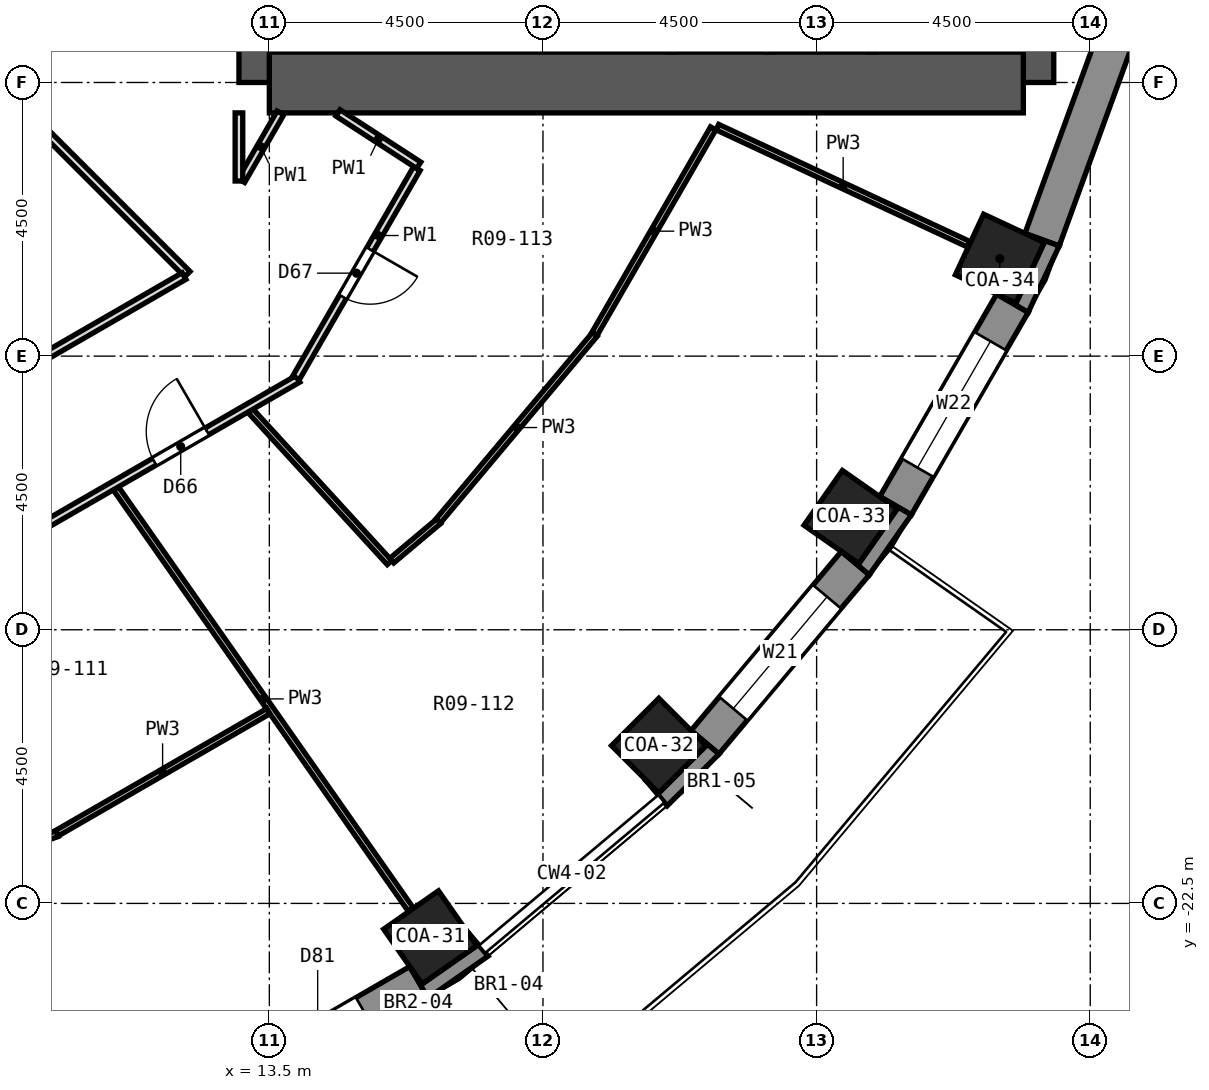
"""IFC4 building model, lengths in metres.
Left out: names, types, materials, properties, quantities, classifications, styles, units other than length and angle.
Written with IfcOpenShell. Run it as: python <this file> out.ifc"""

import sys

from ifc_helpers import new_model, si_unit, direction, frame, frame_2d, origin, origin_2d, place, context, subcontext, project, spatial, polyline, rectangle, outline, extrude, element, fill, save


model = new_model("IFC4")
c1 = context("Model", 3, precision=1e-05, world=origin(), true_north=direction((0.0, 1.0)))
c2 = subcontext(c1, "Body", "Model", "MODEL_VIEW")
j1 = project(units=[si_unit("LENGTHUNIT", "METRE"), si_unit("PLANEANGLEUNIT", "RADIAN")], contexts=[c1])
p1 = place(None, origin())
s1 = spatial("IfcSite", under=j1, at=p1, CompositionType="ELEMENT")
p2 = place(p1, origin())
s2 = spatial("IfcBuilding", under=s1, at=p2, CompositionType="ELEMENT")
p3 = place(p2, frame((0.0, 0.0, 26.3)))
s3 = spatial("IfcBuildingStorey", under=s2, at=p3, CompositionType="ELEMENT", Elevation=26.3)
p4 = place(p3, frame((16.146, -23.059, -0.55), z_axis=(0.0, 0.0, 1.0), x_axis=(0.573576436351, -0.819152044289, 0.0)))
e1 = element("IfcColumn", 1, at=p4, inside=s3, PredefinedType="COLUMN", context=c2, shape_type="SweptSolid", body=[
    extrude(rectangle(XDim=1.1, YDim=1.1, at=origin_2d()), origin(), (0.0, 0.0, 1.0), 3.85),
])
p5 = place(p3, frame((19.905, -19.905, 0.0), z_axis=(0.0, 0.0, 1.0), x_axis=(0.707106781187, -0.707106781187, 0.0)))
e2 = element("IfcColumn", 2, at=p5, inside=s3, PredefinedType="COLUMN", context=c2, shape_type="SweptSolid", body=[
    extrude(rectangle(XDim=1.1, YDim=1.1, at=origin_2d()), origin(), (0.0, 0.0, 1.0), 3.3),
])
p6 = place(p3, frame((23.059, -16.146, -0.55), z_axis=(0.0, 0.0, 1.0), x_axis=(0.819152044289, -0.573576436351, 0.0)))
e3 = element("IfcColumn", 3, at=p6, inside=s3, PredefinedType="COLUMN", context=c2, shape_type="SweptSolid", body=[
    extrude(rectangle(XDim=1.1, YDim=1.1, at=origin_2d()), origin(), (0.0, 0.0, 1.0), 3.85),
])
p7 = place(p3, frame((25.512, -11.897, 0.0), z_axis=(0.0, 0.0, 1.0), x_axis=(0.906307787037, -0.422618261741, 0.0)))
e4 = element("IfcColumn", 4, at=p7, inside=s3, PredefinedType="COLUMN", context=c2, shape_type="SweptSolid", body=[
    extrude(rectangle(XDim=1.1, YDim=1.1, at=origin_2d()), origin(), (0.0, 0.0, 1.0), 3.3),
])
p8 = place(p3, frame((13.5, -9.0, 0.0), z_axis=(0.0, 0.0, 1.0), x_axis=(0.0, 1.0, 0.0)))
e5 = element("IfcWall", 5, at=p8, inside=s3, PredefinedType="SHEAR", context=c2, shape_type="SweptSolid", body=[
    extrude(rectangle(XDim=18.0, YDim=1.0, at=frame_2d((9.0, 0.0))), origin(), (0.0, 0.0, 1.0), 3.3),
])
p9 = place(p8, frame((15.4, 0.0, 0.0)))
e6 = element("IfcOpeningElement", 6, at=p9, cuts=e5, PredefinedType="OPENING", context=c2, shape_type="SweptSolid", body=[
    extrude(rectangle(XDim=1.2, YDim=2.1, at=frame_2d((0.6, 1.05))), frame((0.0, 0.512, 0.0), z_axis=(0.0, -1.0, 0.0), x_axis=(1.0, 0.0, 0.0)), (0.0, 0.0, 1.0), 1.024),
])
p10 = place(p8, frame((1.4, 0.0, 0.0)))
e7 = element("IfcOpeningElement", 7, at=p10, cuts=e5, PredefinedType="OPENING", context=c2, shape_type="SweptSolid", body=[
    extrude(rectangle(XDim=1.2, YDim=2.1, at=frame_2d((0.6, 1.05))), frame((0.0, 0.512, 0.0), z_axis=(0.0, -1.0, 0.0), x_axis=(1.0, 0.0, 0.0)), (0.0, 0.0, 1.0), 1.024),
])
p11 = place(p8, frame((7.5, 0.0, 0.0)))
e8 = element("IfcOpeningElement", 8, at=p11, cuts=e5, PredefinedType="OPENING", context=c2, shape_type="SweptSolid", body=[
    extrude(rectangle(XDim=3.0, YDim=2.4, at=frame_2d((1.5, 1.2))), frame((0.0, 0.512, 0.0), z_axis=(0.0, -1.0, 0.0), x_axis=(1.0, 0.0, 0.0)), (0.0, 0.0, 1.0), 1.024),
])
p12 = place(p3, frame((25.9, -9.0, 0.0), z_axis=(0.0, 0.0, 1.0), x_axis=(0.0, 1.0, 0.0)))
e9 = element("IfcWall", 9, at=p12, inside=s3, PredefinedType="SHEAR", context=c2, shape_type="SweptSolid", body=[
    extrude(rectangle(XDim=18.0, YDim=1.0, at=frame_2d((9.0, 0.0))), origin(), (0.0, 0.0, 1.0), 3.3),
])
p13 = place(p3, frame((13.5, -9.0, 0.0), z_axis=(0.0, 0.0, 1.0), x_axis=(1.0, 0.0, 0.0)))
e10 = element("IfcWall", 10, at=p13, inside=s3, PredefinedType="SHEAR", context=c2, shape_type="SweptSolid", body=[
    extrude(rectangle(XDim=12.4, YDim=1.0, at=frame_2d((6.2, 0.0))), origin(), (0.0, 0.0, 1.0), 3.3),
])
p14 = place(p3, frame((12.63, -25.721, 0.0), z_axis=(0.0, 0.0, 1.0), x_axis=(0.86603124159, 0.499989888488, 0.0)))
e11 = element("IfcWall", 11, at=p14, inside=s3, PredefinedType="SOLIDWALL", context=c2, shape_type="SweptSolid", body=[
    extrude(rectangle(XDim=3.846, YDim=0.6, at=frame_2d((1.923, 0.0))), origin(), (0.0, 0.0, 1.0), 2.75),
])
p15 = place(p14, frame((1.023, 0.0, 0.0)))
e12 = element("IfcOpeningElement", 12, at=p15, cuts=e11, PredefinedType="OPENING", context=c2, shape_type="SweptSolid", body=[
    extrude(rectangle(XDim=1.8, YDim=2.4, at=frame_2d((0.9, 1.2))), frame((0.0, 0.312, 0.0), z_axis=(0.0, -1.0, 0.0), x_axis=(1.0, 0.0, 0.0)), (0.0, 0.0, 1.0), 0.624),
])
p16 = place(p3, frame((20.665, -19.85, 0.0), z_axis=(0.0, 0.0, 1.0), x_axis=(0.642809392687, 0.766026164483, 0.0)))
e13 = element("IfcWall", 13, at=p16, inside=s3, PredefinedType="SOLIDWALL", context=c2, shape_type="SweptSolid", body=[
    extrude(rectangle(XDim=3.846, YDim=0.6, at=frame_2d((1.923, 0.0))), origin(), (0.0, 0.0, 1.0), 2.75),
])
p17 = place(p16, frame((0.723, 0.0, 0.9)))
e14 = element("IfcOpeningElement", 14, at=p17, cuts=e13, PredefinedType="OPENING", context=c2, shape_type="SweptSolid", body=[
    extrude(rectangle(XDim=2.4, YDim=1.8, at=frame_2d((1.2, 0.9))), frame((0.0, 0.312, 0.0), z_axis=(0.0, -1.0, 0.0), x_axis=(1.0, 0.0, 0.0)), (0.0, 0.0, 1.0), 0.624),
])
p18 = place(p3, frame((23.798, -15.96, 0.0), z_axis=(0.0, 0.0, 1.0), x_axis=(0.499989888488, 0.86603124159, 0.0)))
e15 = element("IfcWall", 15, at=p18, inside=s3, PredefinedType="SOLIDWALL", context=c2, shape_type="SweptSolid", body=[
    extrude(rectangle(XDim=3.846, YDim=0.6, at=frame_2d((1.923, 0.0))), origin(), (0.0, 0.0, 1.0), 2.75),
])
p19 = place(p18, frame((0.723, 0.0, 0.9)))
e16 = element("IfcOpeningElement", 16, at=p19, cuts=e15, PredefinedType="OPENING", context=c2, shape_type="SweptSolid", body=[
    extrude(rectangle(XDim=2.4, YDim=1.8, at=frame_2d((1.2, 0.9))), frame((0.0, 0.312, 0.0), z_axis=(0.0, -1.0, 0.0), x_axis=(1.0, 0.0, 0.0)), (0.0, 0.0, 1.0), 0.624),
])
p20 = place(p3, frame((26.208, -11.585, 0.0), z_axis=(0.0, 0.0, 1.0), x_axis=(0.342028474173, 0.939689588564, 0.0)))
e17 = element("IfcWall", 17, at=p20, inside=s3, PredefinedType="SOLIDWALL", context=c2, shape_type="SweptSolid", body=[
    extrude(rectangle(XDim=3.846, YDim=0.6, at=frame_2d((1.923, 0.0))), origin(), (0.0, 0.0, 1.0), 2.75),
])
p21 = place(p3, origin())
e18 = element("IfcWall", 18, at=p21, inside=s3, PredefinedType="SOLIDWALL", context=c2, shape_type="SweptSolid", body=[
    extrude(outline(polyline([(16.11, -24.058), (17.097, -23.367), (16.711, -22.907), (16.912, -23.194), (16.011, -23.825), (15.81, -23.538), (16.11, -24.058)])), origin(), (0.0, 0.0, 1.0), 2.75),
])
p22 = place(p3, origin())
e19 = element("IfcWall", 19, at=p22, inside=s3, PredefinedType="SOLIDWALL", context=c2, shape_type="SweptSolid", body=[
    extrude(outline(polyline([(20.895, -20.043), (20.435, -19.657), (20.683, -19.905), (19.905, -20.683), (19.657, -20.435), (20.043, -20.895), (20.895, -20.043)])), origin(), (0.0, 0.0, 1.0), 2.75),
])
p23 = place(p3, origin())
e20 = element("IfcWall", 20, at=p23, inside=s3, PredefinedType="SOLIDWALL", context=c2, shape_type="SweptSolid", body=[
    extrude(outline(polyline([(23.367, -17.097), (24.058, -16.11), (23.538, -15.81), (23.825, -16.011), (23.194, -16.912), (22.907, -16.711), (23.367, -17.097)])), origin(), (0.0, 0.0, 1.0), 2.75),
])
p24 = place(p3, origin())
e21 = element("IfcWall", 21, at=p24, inside=s3, PredefinedType="SOLIDWALL", context=c2, shape_type="SweptSolid", body=[
    extrude(outline(polyline([(26.49, -11.688), (25.926, -11.483), (26.243, -11.631), (25.779, -12.628), (25.461, -12.479), (25.981, -12.78), (26.49, -11.688)])), origin(), (0.0, 0.0, 1.0), 2.75),
])
p25 = place(p3, frame((10.976, -15.674, 0.0), z_axis=(0.0, 0.0, 1.0), x_axis=(0.573553424511, -0.819168156872, 0.0)))
e22 = element("IfcWall", 22, at=p25, inside=s3, PredefinedType="PARTITIONING", context=c2, shape_type="SweptSolid", body=[
    extrude(rectangle(XDim=8.455, YDim=0.1, at=frame_2d((4.228, 0.0))), origin(), (0.0, 0.0, 1.0), 2.75),
])
p26 = place(p3, frame((13.187, -14.396, 0.0), z_axis=(0.0, 0.0, 1.0), x_axis=(0.675447264994, -0.737408294103, 0.0)))
e23 = element("IfcWall", 23, at=p26, inside=s3, PredefinedType="PARTITIONING", context=c2, shape_type="SweptSolid", body=[
    extrude(rectangle(XDim=3.389, YDim=0.1, at=frame_2d((1.694, 0.0))), origin(), (0.0, 0.0, 1.0), 2.75),
])
p27 = place(p3, frame((6.783, -6.783, 0.0), z_axis=(0.0, 0.0, 1.0), x_axis=(0.707106781187, -0.707106781187, 0.0)))
e24 = element("IfcWall", 24, at=p27, inside=s3, PredefinedType="PARTITIONING", context=c2, shape_type="SweptSolid", body=[
    extrude(rectangle(XDim=7.594, YDim=0.125, at=frame_2d((3.797, 0.0))), origin(), (0.0, 0.0, 1.0), 2.75),
])
p28 = place(p3, frame((14.629, -9.5, 0.0), z_axis=(0.0, 0.0, 1.0), x_axis=(0.838795721465, -0.544446267002, 0.0)))
e25 = element("IfcWall", 25, at=p28, inside=s3, PredefinedType="PARTITIONING", context=c2, shape_type="SweptSolid", body=[
    extrude(rectangle(XDim=1.583, YDim=0.125, at=frame_2d((0.792, 0.0))), origin(), (0.0, 0.0, 1.0), 2.75),
])
p29 = place(p3, frame((20.868, -9.734, 0.0), z_axis=(0.0, 0.0, 1.0), x_axis=(0.906374415398, -0.422475347342, 0.0)))
e26 = element("IfcWall", 26, at=p29, inside=s3, PredefinedType="PARTITIONING", context=c2, shape_type="SweptSolid", body=[
    extrude(rectangle(XDim=4.563, YDim=0.1, at=frame_2d((2.281, 0.0))), origin(), (0.0, 0.0, 1.0), 2.75),
])
p30 = place(p3, frame((8.956, -21.738, 0.0), z_axis=(0.0, 0.0, 1.0), x_axis=(0.939501535219, 0.342544690983, 0.0)))
e27 = element("IfcWall", 27, at=p30, inside=s3, PredefinedType="PARTITIONING", context=c2, shape_type="SweptSolid", body=[
    extrude(rectangle(XDim=1.125, YDim=0.1, at=frame_2d((0.562, 0.0))), origin(), (0.0, 0.0, 1.0), 2.75),
])
p31 = place(p3, frame((10.008, -21.345, 0.0), z_axis=(0.0, 0.0, 1.0), x_axis=(0.866077124662, 0.49991040611, 0.0)))
e28 = element("IfcWall", 28, at=p31, inside=s3, PredefinedType="PARTITIONING", context=c2, shape_type="SweptSolid", body=[
    extrude(rectangle(XDim=4.01, YDim=0.1, at=frame_2d((2.005, 0.0))), origin(), (0.0, 0.0, 1.0), 2.75),
])
p32 = place(p3, frame((5.156, -18.962, 0.0), z_axis=(0.0, 0.0, 1.0), x_axis=(0.86602502492, 0.500000656212, 0.0)))
e29 = element("IfcWall", 29, at=p32, inside=s3, PredefinedType="PARTITIONING", context=c2, shape_type="SweptSolid", body=[
    extrude(rectangle(XDim=10.179, YDim=0.125, at=frame_2d((5.09, 0.0))), origin(), (0.0, 0.0, 1.0), 2.75),
])
p33 = place(p32, frame((0.681, 0.0, 0.0)))
e30 = element("IfcOpeningElement", 30, at=p33, cuts=e29, PredefinedType="OPENING", context=c2, shape_type="SweptSolid", body=[
    extrude(rectangle(XDim=1.0, YDim=2.1, at=frame_2d((0.5, 1.05))), frame((0.0, 0.074, 0.0), z_axis=(0.0, -1.0, 0.0), x_axis=(1.0, 0.0, 0.0)), (0.0, 0.0, 1.0), 0.149),
])
p34 = place(p32, frame((4.108, 0.0, 0.0)))
e31 = element("IfcOpeningElement", 31, at=p34, cuts=e29, PredefinedType="OPENING", context=c2, shape_type="SweptSolid", body=[
    extrude(rectangle(XDim=0.9, YDim=2.1, at=frame_2d((0.45, 1.05))), frame((0.0, 0.074, 0.0), z_axis=(0.0, -1.0, 0.0), x_axis=(1.0, 0.0, 0.0)), (0.0, 0.0, 1.0), 0.149),
])
p35 = place(p32, frame((7.452, 0.0, 0.0)))
e32 = element("IfcOpeningElement", 32, at=p35, cuts=e29, PredefinedType="OPENING", context=c2, shape_type="SweptSolid", body=[
    extrude(rectangle(XDim=1.0, YDim=2.1, at=frame_2d((0.5, 1.05))), frame((0.0, 0.074, 0.0), z_axis=(0.0, -1.0, 0.0), x_axis=(1.0, 0.0, 0.0)), (0.0, 0.0, 1.0), 0.149),
])
p36 = place(p3, frame((4.502, -16.569, 0.0), z_axis=(0.0, 0.0, 1.0), x_axis=(0.8660196372, 0.500009987883, 0.0)))
e33 = element("IfcWall", 33, at=p36, inside=s3, PredefinedType="PARTITIONING", context=c2, shape_type="SweptSolid", body=[
    extrude(rectangle(XDim=8.771, YDim=0.125, at=frame_2d((4.385, 0.0))), origin(), (0.0, 0.0, 1.0), 2.75),
])
p37 = place(p36, frame((3.885, 0.0, 0.0)))
e34 = element("IfcOpeningElement", 34, at=p37, cuts=e33, PredefinedType="OPENING", context=c2, shape_type="SweptSolid", body=[
    extrude(rectangle(XDim=1.0, YDim=2.1, at=frame_2d((0.5, 1.05))), frame((0.0, 0.074, 0.0), z_axis=(0.0, -1.0, 0.0), x_axis=(1.0, 0.0, 0.0)), (0.0, 0.0, 1.0), 0.149),
])
p38 = place(p3, frame((15.514, -16.863, 0.0), z_axis=(0.0, 0.0, 1.0), x_axis=(0.765614200219, 0.643300004992, 0.0)))
e35 = element("IfcWall", 35, at=p38, inside=s3, PredefinedType="PARTITIONING", context=c2, shape_type="SweptSolid", body=[
    extrude(rectangle(XDim=1.008, YDim=0.1, at=frame_2d((0.504, 0.0))), origin(), (0.0, 0.0, 1.0), 2.75),
])
p39 = place(p3, frame((16.279, -16.209, 0.0), z_axis=(0.0, 0.0, 1.0), x_axis=(0.642907640475, 0.765943709302, 0.0)))
e36 = element("IfcWall", 36, at=p39, inside=s3, PredefinedType="PARTITIONING", context=c2, shape_type="SweptSolid", body=[
    extrude(rectangle(XDim=4.006, YDim=0.1, at=frame_2d((2.003, 0.0))), origin(), (0.0, 0.0, 1.0), 2.75),
])
p40 = place(p3, frame((18.847, -13.136, 0.0), z_axis=(0.0, 0.0, 1.0), x_axis=(0.499985873194, 0.866033559746, 0.0)))
e37 = element("IfcWall", 37, at=p40, inside=s3, PredefinedType="PARTITIONING", context=c2, shape_type="SweptSolid", body=[
    extrude(rectangle(XDim=3.904, YDim=0.1, at=frame_2d((1.952, 0.0))), origin(), (0.0, 0.0, 1.0), 2.75),
])
p41 = place(p3, frame((13.94, -13.855, 0.0), z_axis=(0.0, 0.0, 1.0), x_axis=(0.500020477838, 0.866013580576, 0.0)))
e38 = element("IfcWall", 38, at=p41, inside=s3, PredefinedType="PARTITIONING", context=c2, shape_type="SweptSolid", body=[
    extrude(rectangle(XDim=3.971, YDim=0.125, at=frame_2d((1.985, 0.0))), origin(), (0.0, 0.0, 1.0), 2.75),
])
p42 = place(p41, frame((1.535, 0.0, 0.0)))
e39 = element("IfcOpeningElement", 39, at=p42, cuts=e38, PredefinedType="OPENING", context=c2, shape_type="SweptSolid", body=[
    extrude(rectangle(XDim=0.9, YDim=2.1, at=frame_2d((0.45, 1.05))), frame((0.0, 0.074, 0.0), z_axis=(0.0, -1.0, 0.0), x_axis=(1.0, 0.0, 0.0)), (0.0, 0.0, 1.0), 0.149),
])
p43 = place(p3, frame((13.04, -10.614, 0.0), z_axis=(0.0, 0.0, 1.0), x_axis=(0.500018234033, 0.866014876105, 0.0)))
e40 = element("IfcWall", 40, at=p43, inside=s3, PredefinedType="PARTITIONING", context=c2, shape_type="SweptSolid", body=[
    extrude(rectangle(XDim=1.286, YDim=0.125, at=frame_2d((0.643, 0.0))), origin(), (0.0, 0.0, 1.0), 2.75),
])
p44 = place(p3, frame((13.0, -10.621, 0.0), z_axis=(0.0, 0.0, 1.0), x_axis=(0.0, 1.0, 0.0)))
e41 = element("IfcWall", 41, at=p44, inside=s3, PredefinedType="PARTITIONING", context=c2, shape_type="SweptSolid", body=[
    extrude(rectangle(XDim=1.121, YDim=0.125, at=frame_2d((0.56, 0.0))), origin(), (0.0, 0.0, 1.0), 2.75),
])
p45 = place(p3, frame((20.11, -8.5, 0.0), z_axis=(0.0, 0.0, 1.0), x_axis=(0.0, 1.0, 0.0)))
e42 = element("IfcWall", 42, at=p45, inside=s3, PredefinedType="PARTITIONING", context=c2, shape_type="SweptSolid", body=[
    extrude(rectangle(XDim=3.2, YDim=0.1, at=frame_2d((1.6, 0.0))), origin(), (0.0, 0.0, 1.0), 2.75),
])
p46 = place(p3, frame((21.732, -8.5, 0.0), z_axis=(0.0, 0.0, 1.0), x_axis=(0.0, 1.0, 0.0)))
e43 = element("IfcWall", 43, at=p46, inside=s3, PredefinedType="PARTITIONING", context=c2, shape_type="SweptSolid", body=[
    extrude(rectangle(XDim=3.2, YDim=0.1, at=frame_2d((1.6, 0.0))), origin(), (0.0, 0.0, 1.0), 2.75),
])
p47 = place(p46, frame((1.15, 0.0, 0.0)))
e44 = element("IfcOpeningElement", 44, at=p47, cuts=e43, PredefinedType="OPENING", context=c2, shape_type="SweptSolid", body=[
    extrude(rectangle(XDim=0.9, YDim=2.1, at=frame_2d((0.45, 1.05))), frame((0.0, 0.062, 0.0), z_axis=(0.0, -1.0, 0.0), x_axis=(1.0, 0.0, 0.0)), (0.0, 0.0, 1.0), 0.124),
])
p48 = place(p3, frame((23.409, -8.5, 0.0), z_axis=(0.0, 0.0, 1.0), x_axis=(0.0, 1.0, 0.0)))
e45 = element("IfcWall", 45, at=p48, inside=s3, PredefinedType="PARTITIONING", context=c2, shape_type="SweptSolid", body=[
    extrude(rectangle(XDim=3.2, YDim=0.1, at=frame_2d((1.6, 0.0))), origin(), (0.0, 0.0, 1.0), 2.75),
])
p49 = place(p48, frame((1.15, 0.0, 0.0)))
e46 = element("IfcOpeningElement", 46, at=p49, cuts=e45, PredefinedType="OPENING", context=c2, shape_type="SweptSolid", body=[
    extrude(rectangle(XDim=0.9, YDim=2.1, at=frame_2d((0.45, 1.05))), frame((0.0, 0.062, 0.0), z_axis=(0.0, -1.0, 0.0), x_axis=(1.0, 0.0, 0.0)), (0.0, 0.0, 1.0), 0.124),
])
p50 = place(p15, frame((1.8, 0.0, 0.0), z_axis=(0.0, 0.0, 1.0), x_axis=(-1.0, 0.0, 0.0)))
e47 = element("IfcDoor", 47, at=p50, inside=s3, OperationType="DOUBLE_DOOR_SINGLE_SWING", PredefinedType="DOOR", context=c2, shape_type="SweptSolid", body=[
    extrude(rectangle(XDim=1.8, YDim=2.4, at=frame_2d((0.9, 1.2))), frame((0.0, -0.075, 0.0), z_axis=(0.0, -1.0, 0.0), x_axis=(1.0, 0.0, 0.0)), (0.0, 0.0, 1.0), 0.05),
])
fill(e12, e47)
p51 = place(p17, origin())
e48 = element("IfcWindow", 48, at=p51, inside=s3, PartitioningType="SINGLE_PANEL", PredefinedType="WINDOW", context=c2, shape_type="SweptSolid", body=[
    extrude(rectangle(XDim=2.4, YDim=1.8, at=frame_2d((1.2, 0.9))), frame((0.0, 0.18, 0.0), z_axis=(0.0, -1.0, 0.0), x_axis=(1.0, 0.0, 0.0)), (0.0, 0.0, 1.0), 0.06),
])
fill(e14, e48)
p52 = place(p19, origin())
e49 = element("IfcWindow", 49, at=p52, inside=s3, PartitioningType="SINGLE_PANEL", PredefinedType="WINDOW", context=c2, shape_type="SweptSolid", body=[
    extrude(rectangle(XDim=2.4, YDim=1.8, at=frame_2d((1.2, 0.9))), frame((0.0, 0.18, 0.0), z_axis=(0.0, -1.0, 0.0), x_axis=(1.0, 0.0, 0.0)), (0.0, 0.0, 1.0), 0.06),
])
fill(e16, e49)
p53 = place(p35, origin())
e50 = element("IfcDoor", 50, at=p53, inside=s3, OperationType="SINGLE_SWING_RIGHT", PredefinedType="DOOR", context=c2, shape_type="SweptSolid", body=[
    extrude(rectangle(XDim=1.0, YDim=2.1, at=frame_2d((0.5, 1.05))), frame((0.0, 0.025, 0.0), z_axis=(0.0, -1.0, 0.0), x_axis=(1.0, 0.0, 0.0)), (0.0, 0.0, 1.0), 0.05),
])
fill(e32, e50)
p54 = place(p42, frame((0.9, 0.0, 0.0), z_axis=(0.0, 0.0, 1.0), x_axis=(-1.0, 0.0, 0.0)))
e51 = element("IfcDoor", 51, at=p54, inside=s3, OperationType="SINGLE_SWING_LEFT", PredefinedType="DOOR", context=c2, shape_type="SweptSolid", body=[
    extrude(rectangle(XDim=0.9, YDim=2.1, at=frame_2d((0.45, 1.05))), frame((0.0, 0.025, 0.0), z_axis=(0.0, -1.0, 0.0), x_axis=(1.0, 0.0, 0.0)), (0.0, 0.0, 1.0), 0.05),
])
fill(e39, e51)
save(model, sys.argv[1])
